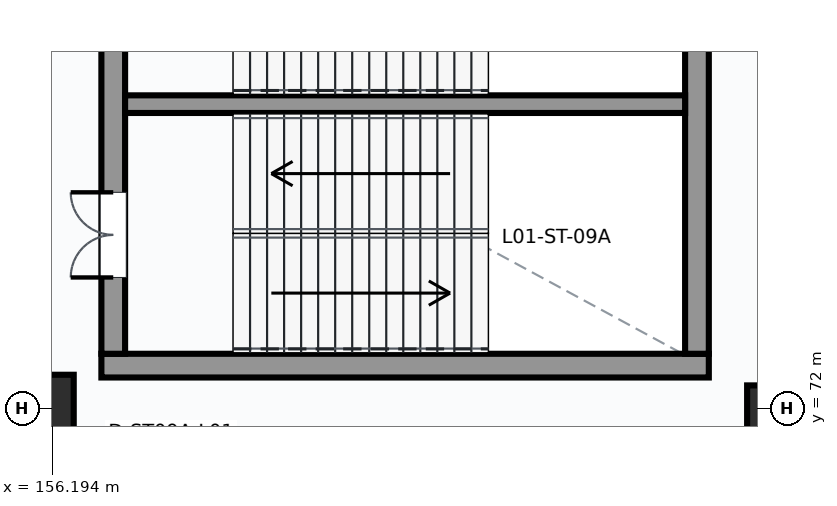
"""IFC4 building model, lengths in metres.
Left out: names, types, materials, properties, quantities, classifications, styles, units other than length and angle.
Written with IfcOpenShell. Run it as: python <this file> out.ifc"""

import sys

from ifc_helpers import new_model, si_unit, direction, frame, frame_2d, origin, origin_2d, place, context, subcontext, project, spatial, rectangle, extrude, element, fill, save


model = new_model("IFC4")
c1 = context("Model", 3, precision=1e-05, world=origin(), true_north=direction((0.0, 1.0)))
c2 = subcontext(c1, "Body", "Model", "MODEL_VIEW")
j1 = project(units=[si_unit("LENGTHUNIT", "METRE"), si_unit("PLANEANGLEUNIT", "RADIAN")], contexts=[c1])
p1 = place(None, origin())
s1 = spatial("IfcSite", under=j1, at=p1, CompositionType="ELEMENT")
p2 = place(p1, origin())
s2 = spatial("IfcBuilding", under=s1, at=p2, CompositionType="ELEMENT")
p3 = place(p2, frame((0.0, 0.0, 5.4)))
s3 = spatial("IfcBuildingStorey", under=s2, at=p3, CompositionType="ELEMENT", Elevation=5.4)
p4 = place(p3, frame((156.0, 72.0, 0.0), z_axis=(0.0, 0.0, 1.0), x_axis=(1.0, 0.0, 0.0)))
e1 = element("IfcColumn", 1, at=p4, inside=s3, PredefinedType="COLUMN", context=c2, shape_type="SweptSolid", body=[
    extrude(rectangle(XDim=1.1, YDim=1.1, at=origin_2d()), origin(), (0.0, 0.0, 1.0), 4.8),
])
p5 = place(p3, frame((168.0, 72.0, 0.0), z_axis=(0.0, 0.0, 1.0), x_axis=(1.0, 0.0, 0.0)))
e2 = element("IfcColumn", 2, at=p5, inside=s3, PredefinedType="COLUMN", context=c2, shape_type="SweptSolid", body=[
    extrude(rectangle(XDim=0.75, YDim=0.75, at=origin_2d()), origin(), (0.0, 0.0, 1.0), 4.8),
])
p6 = place(p3, frame((157.005, 72.7, 0.0), z_axis=(0.0, 0.0, 1.0), x_axis=(1.0, 0.0, 0.0)))
e3 = element("IfcWall", 3, at=p6, inside=s3, PredefinedType="SHEAR", context=c2, shape_type="SweptSolid", body=[
    extrude(rectangle(XDim=9.99, YDim=0.39, at=frame_2d((4.995, 0.0))), origin(), (0.0, 0.0, 1.0), 4.8),
])
p7 = place(p3, frame((157.2, 72.895, 0.0), z_axis=(0.0, 0.0, 1.0), x_axis=(0.0, 1.0, 0.0)))
e4 = element("IfcWall", 4, at=p7, inside=s3, PredefinedType="SHEAR", context=c2, shape_type="SweptSolid", body=[
    extrude(rectangle(XDim=8.21, YDim=0.39, at=frame_2d((4.105, 0.0))), origin(), (0.0, 0.0, 1.0), 4.8),
])
p8 = place(p7, frame((1.255, 0.0, 0.0)))
e5 = element("IfcOpeningElement", 5, at=p8, cuts=e4, PredefinedType="OPENING", context=c2, shape_type="SweptSolid", body=[
    extrude(rectangle(XDim=1.4, YDim=2.2, at=frame_2d((0.7, 1.1))), frame((0.0, 0.205, 0.0), z_axis=(0.0, -1.0, 0.0), x_axis=(1.0, 0.0, 0.0)), (0.0, 0.0, 1.0), 0.41),
])
p9 = place(p7, frame((5.595, 0.0, 0.0)))
e6 = element("IfcOpeningElement", 6, at=p9, cuts=e4, PredefinedType="OPENING", context=c2, shape_type="SweptSolid", body=[
    extrude(rectangle(XDim=1.32, YDim=2.2, at=frame_2d((0.66, 1.1))), frame((0.0, 0.205, 0.0), z_axis=(0.0, -1.0, 0.0), x_axis=(1.0, 0.0, 0.0)), (0.0, 0.0, 1.0), 0.41),
])
p10 = place(p3, frame((166.8, 72.895, 0.0), z_axis=(0.0, 0.0, 1.0), x_axis=(0.0, 1.0, 0.0)))
e7 = element("IfcWall", 7, at=p10, inside=s3, PredefinedType="SHEAR", context=c2, shape_type="SweptSolid", body=[
    extrude(rectangle(XDim=8.21, YDim=0.39, at=frame_2d((4.105, 0.0))), origin(), (0.0, 0.0, 1.0), 4.8),
])
p11 = place(p3, frame((157.395, 77.0, 0.0), z_axis=(0.0, 0.0, 1.0), x_axis=(1.0, 0.0, 0.0)))
e8 = element("IfcWall", 8, at=p11, inside=s3, PredefinedType="SHEAR", context=c2, shape_type="SweptSolid", body=[
    extrude(rectangle(XDim=9.21, YDim=0.29, at=frame_2d((4.605, 0.0))), origin(), (0.0, 0.0, 1.0), 4.8),
])
p12 = place(p8, origin())
e9 = element("IfcDoor", 9, at=p12, inside=s3, OperationType="DOUBLE_DOOR_SINGLE_SWING", PredefinedType="DOOR", context=c2, shape_type="SweptSolid", body=[
    extrude(rectangle(XDim=1.4, YDim=2.2, at=frame_2d((0.7, 1.1))), frame((0.0, 0.025, 0.0), z_axis=(0.0, -1.0, 0.0), x_axis=(1.0, 0.0, 0.0)), (0.0, 0.0, 1.0), 0.05),
])
fill(e5, e9)
save(model, sys.argv[1])
